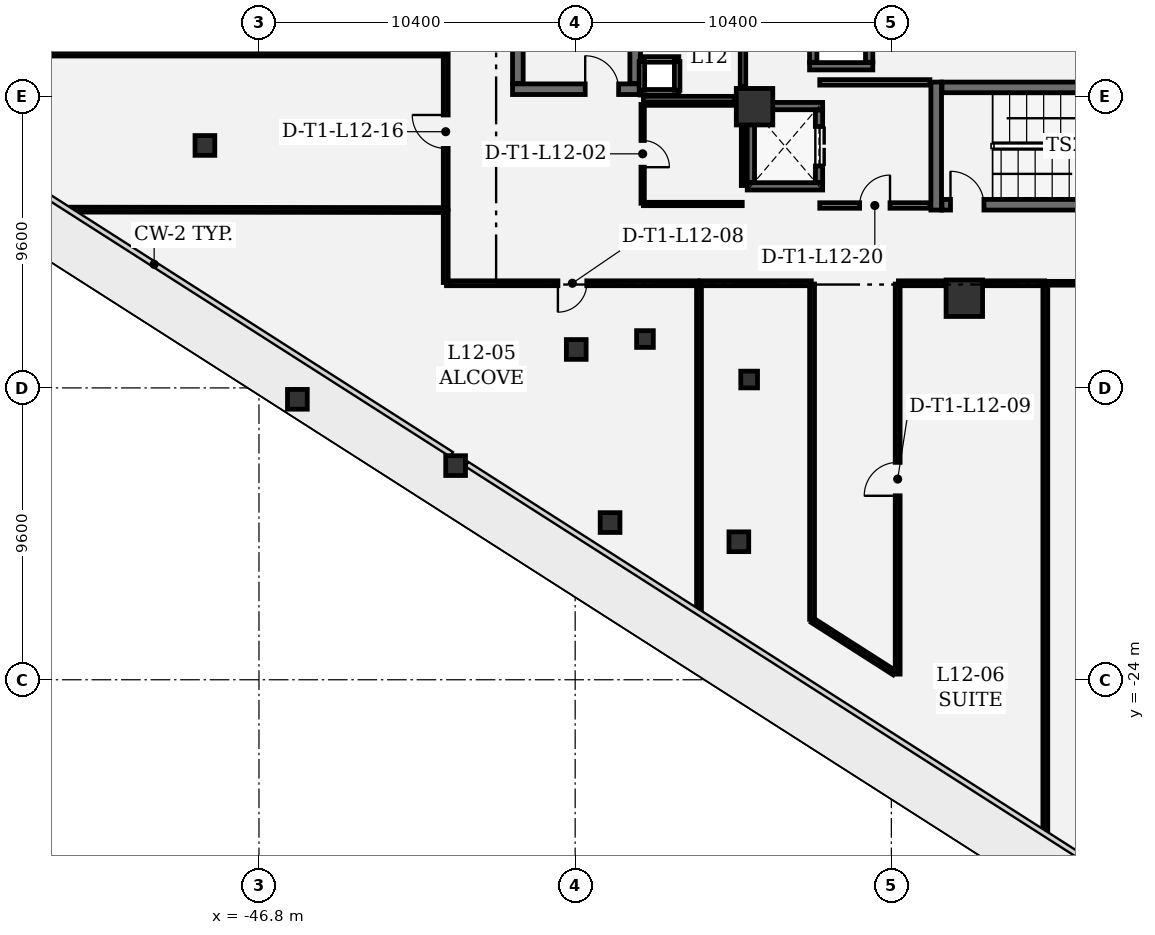
"""IFC4 building model, lengths in metres.
Left out: names, types, materials, properties, quantities, classifications, styles, units other than length and angle.
Written with IfcOpenShell. Run it as: python <this file> out.ifc"""

import sys

from ifc_helpers import new_model, si_unit, direction, frame, frame_2d, origin, origin_2d, place, context, subcontext, project, spatial, rectangle, extrude, element, fill, save


model = new_model("IFC4")
c1 = context("Model", 3, precision=1e-05, world=origin(), true_north=direction((0.0, 1.0)))
c2 = subcontext(c1, "Body", "Model", "MODEL_VIEW")
j1 = project(units=[si_unit("LENGTHUNIT", "METRE"), si_unit("PLANEANGLEUNIT", "RADIAN")], contexts=[c1])
p1 = place(None, origin())
s1 = spatial("IfcSite", under=j1, at=p1, CompositionType="ELEMENT")
p2 = place(p1, origin())
s2 = spatial("IfcBuilding", under=s1, at=p2, CompositionType="ELEMENT")
p3 = place(p2, frame((0.0, 0.0, 57.6)))
s3 = spatial("IfcBuildingStorey", under=s2, at=p3, CompositionType="ELEMENT", Elevation=57.6)
for number, where, z_axis, x_axis in (
    (1, (-23.6, -11.45, 0.0), (0.0, 0.0, 1.0), (1.0, 0.0, 0.0)),
    (2, (-30.5, -5.15, 0.0), (0.0, 0.0, 1.0), (1.0, 0.0, 0.0)),
):
    element("IfcColumn", number, at=place(p3, frame(where, z_axis=z_axis, x_axis=x_axis)), inside=s3, PredefinedType="COLUMN", context=c2, shape_type="SweptSolid", body=[
        extrude(rectangle(XDim=1.2, YDim=1.2, at=origin_2d()), origin(), (0.0, 0.0, 1.0), 4.2),
    ])
for number, where, z_axis, x_axis in (
    (3, (-45.536, -14.775, 0.0), (0.0, 0.0, 1.0), (1.0, 0.0, 0.0)),
    (4, (-40.333, -16.956, 0.0), (0.0, 0.0, 1.0), (1.0, 0.0, 0.0)),
    (5, (-35.252, -18.829, 0.0), (0.0, 0.0, 1.0), (1.0, 0.0, 0.0)),
    (6, (-31.016, -19.46, 0.0), (0.0, 0.0, 1.0), (1.0, 0.0, 0.0)),
    (7, (-48.578, -6.425, 0.0), (0.0, 0.0, 1.0), (1.0, 0.0, 0.0)),
    (8, (-36.365, -13.135, 0.0), (0.0, 0.0, 1.0), (1.0, 0.0, 0.0)),
):
    element("IfcColumn", number, at=place(p3, frame(where, z_axis=z_axis, x_axis=x_axis)), inside=s3, PredefinedType="COLUMN", context=c2, shape_type="SweptSolid", body=[
        extrude(rectangle(XDim=0.65, YDim=0.65, at=origin_2d()), origin(), (0.0, 0.0, 1.0), 4.2),
    ])
for number, where, z_axis, x_axis in (
    (9, (-34.104, -12.792, 0.0), (0.0, 0.0, 1.0), (1.0, 0.0, 0.0)),
    (10, (-30.677, -14.124, 0.0), (0.0, 0.0, 1.0), (1.0, 0.0, 0.0)),
):
    element("IfcColumn", number, at=place(p3, frame(where, z_axis=z_axis, x_axis=x_axis)), inside=s3, PredefinedType="COLUMN", context=c2, shape_type="SweptSolid", body=[
        extrude(rectangle(XDim=0.55, YDim=0.55, at=origin_2d()), origin(), (0.0, 0.0, 1.0), 4.2),
    ])
p4 = place(p3, frame((-24.525, -4.34, 0.0), z_axis=(0.0, 0.0, 1.0), x_axis=(0.0, -1.0, 0.0)))
e11 = element("IfcWall", 11, at=p4, inside=s3, PredefinedType="SHEAR", context=c2, shape_type="SweptSolid", body=[
    extrude(rectangle(XDim=4.21, YDim=0.35, at=frame_2d((2.105, 0.0))), origin(), (0.0, 0.0, 1.0), 3.92),
])
p5 = place(p3, frame((-24.335, -8.375, 0.0), z_axis=(0.0, 0.0, 1.0), x_axis=(1.0, 0.0, 0.0)))
e12 = element("IfcWall", 12, at=p5, inside=s3, PredefinedType="SHEAR", context=c2, shape_type="SweptSolid", body=[
    extrude(rectangle(XDim=8.12, YDim=0.35, at=frame_2d((4.06, 0.0))), origin(), (0.0, 0.0, 1.0), 3.92),
])
p6 = place(p5, frame((0.28, 0.0, 0.0)))
e13 = element("IfcOpeningElement", 13, at=p6, cuts=e12, PredefinedType="OPENING", context=c2, shape_type="SweptSolid", body=[
    extrude(rectangle(XDim=1.1, YDim=2.2, at=frame_2d((0.55, 1.1))), frame((0.0, 0.185, 0.0), z_axis=(0.0, -1.0, 0.0), x_axis=(1.0, 0.0, 0.0)), (0.0, 0.0, 1.0), 0.37),
])
p7 = place(p3, frame((-16.215, -4.515, 0.0), z_axis=(0.0, 0.0, 1.0), x_axis=(-1.0, 0.0, 0.0)))
e14 = element("IfcWall", 14, at=p7, inside=s3, PredefinedType="SHEAR", context=c2, shape_type="SweptSolid", body=[
    extrude(rectangle(XDim=8.12, YDim=0.35, at=frame_2d((4.06, 0.0))), origin(), (0.0, 0.0, 1.0), 3.92),
])
p8 = place(p3, frame((-38.46, -4.575, 0.0), z_axis=(0.0, 0.0, 1.0), x_axis=(1.0, 0.0, 0.0)))
e15 = element("IfcWall", 15, at=p8, inside=s3, PredefinedType="SHEAR", context=c2, shape_type="SweptSolid", body=[
    extrude(rectangle(XDim=4.21, YDim=0.35, at=frame_2d((2.105, 0.0))), origin(), (0.0, 0.0, 1.0), 3.92),
])
p9 = place(p8, frame((2.39, 0.0, 0.0)))
e16 = element("IfcOpeningElement", 16, at=p9, cuts=e15, PredefinedType="OPENING", context=c2, shape_type="SweptSolid", body=[
    extrude(rectangle(XDim=1.1, YDim=2.2, at=frame_2d((0.55, 1.1))), frame((0.0, 0.185, 0.0), z_axis=(0.0, -1.0, 0.0), x_axis=(1.0, 0.0, 0.0)), (0.0, 0.0, 1.0), 0.37),
])
for number, where, z_axis, x_axis in (
    (17, (-34.425, -4.385, 0.0), (0.0, 0.0, 1.0), (0.0, 1.0, 0.0)),
    (18, (-38.285, 4.385, 0.0), (0.0, 0.0, 1.0), (0.0, -1.0, 0.0)),
):
    element("IfcWall", number, at=place(p3, frame(where, z_axis=z_axis, x_axis=x_axis)), inside=s3, PredefinedType="SHEAR", context=c2, shape_type="SweptSolid", body=[
        extrude(rectangle(XDim=8.77, YDim=0.35, at=frame_2d((4.385, 0.0))), origin(), (0.0, 0.0, 1.0), 3.92),
    ])
for number, where, z_axis, x_axis in (
    (19, (-28.26, -7.77, 0.0), (0.0, 0.0, 1.0), (-1.0, 0.0, 0.0)),
    (20, (-30.74, -5.13, 0.0), (0.0, 0.0, 1.0), (1.0, 0.0, 0.0)),
):
    element("IfcWall", number, at=place(p3, frame(where, z_axis=z_axis, x_axis=x_axis)), inside=s3, PredefinedType="SHEAR", context=c2, shape_type="SweptSolid", body=[
        extrude(rectangle(XDim=2.48, YDim=0.24, at=frame_2d((1.24, 0.0))), origin(), (0.0, 0.0, 1.0), 3.92),
    ])
p10 = place(p3, frame((-30.62, -7.638, 0.0), z_axis=(0.0, 0.0, 1.0), x_axis=(0.0, 1.0, 0.0)))
e21 = element("IfcWall", 21, at=p10, inside=s3, PredefinedType="SHEAR", context=c2, shape_type="SweptSolid", body=[
    extrude(rectangle(XDim=2.376, YDim=0.24, at=frame_2d((1.188, 0.0))), origin(), (0.0, 0.0, 1.0), 3.92),
])
p11 = place(p3, frame((-28.38, -5.262, 0.0), z_axis=(0.0, 0.0, 1.0), x_axis=(0.0, -1.0, 0.0)))
e22 = element("IfcWall", 22, at=p11, inside=s3, PredefinedType="SHEAR", context=c2, shape_type="SweptSolid", body=[
    extrude(rectangle(XDim=2.376, YDim=0.24, at=frame_2d((1.188, 0.0))), origin(), (0.0, 0.0, 1.0), 3.92),
])
p12 = place(p11, frame((0.538, 0.0, 0.0)))
e23 = element("IfcOpeningElement", 23, at=p12, cuts=e22, PredefinedType="OPENING", context=c2, shape_type="SweptSolid", body=[
    extrude(rectangle(XDim=1.3, YDim=2.3, at=frame_2d((0.65, 1.15))), frame((0.0, 0.13, 0.0), z_axis=(0.0, -1.0, 0.0), x_axis=(1.0, 0.0, 0.0)), (0.0, 0.0, 1.0), 0.26),
])
p13 = place(p3, frame((-26.61, -3.82, 0.0), z_axis=(0.0, 0.0, 1.0), x_axis=(-1.0, 0.0, 0.0)))
e24 = element("IfcWall", 24, at=p13, inside=s3, PredefinedType="SHEAR", context=c2, shape_type="SweptSolid", body=[
    extrude(rectangle(XDim=2.08, YDim=0.24, at=frame_2d((1.04, 0.0))), origin(), (0.0, 0.0, 1.0), 3.92),
])
for number, where, z_axis, x_axis in (
    (25, (-28.57, -3.688, 0.0), (0.0, 0.0, 1.0), (0.0, 1.0, 0.0)),
    (26, (-26.73, -1.562, 0.0), (0.0, 0.0, 1.0), (0.0, -1.0, 0.0)),
):
    element("IfcWall", number, at=place(p3, frame(where, z_axis=z_axis, x_axis=x_axis)), inside=s3, PredefinedType="SHEAR", context=c2, shape_type="SweptSolid", body=[
        extrude(rectangle(XDim=2.126, YDim=0.24, at=frame_2d((1.063, 0.0))), origin(), (0.0, 0.0, 1.0), 3.92),
    ])
for number, where, z_axis, x_axis in (
    (27, (-32.99, -4.675, 0.0), (0.0, 0.0, 1.0), (-1.0, 0.0, 0.0)),
    (28, (-34.26, -3.595, 0.0), (0.0, 0.0, 1.0), (1.0, 0.0, 0.0)),
):
    element("IfcWall", number, at=place(p3, frame(where, z_axis=z_axis, x_axis=x_axis)), inside=s3, PredefinedType="PARTITIONING", context=c2, shape_type="SweptSolid", body=[
        extrude(rectangle(XDim=1.27, YDim=0.18, at=frame_2d((0.635, 0.0))), origin(), (0.0, 0.0, 1.0), 3.92),
    ])
for number, where, z_axis, x_axis in (
    (29, (-34.205, -4.61, 0.0), (0.0, 0.0, 1.0), (0.0, 1.0, 0.0)),
    (30, (-33.045, -3.66, 0.0), (0.0, 0.0, 1.0), (0.0, -1.0, 0.0)),
):
    element("IfcWall", number, at=place(p3, frame(where, z_axis=z_axis, x_axis=x_axis)), inside=s3, PredefinedType="PARTITIONING", context=c2, shape_type="SweptSolid", body=[
        extrude(rectangle(XDim=0.95, YDim=0.18, at=frame_2d((0.475, 0.0))), origin(), (0.0, 0.0, 1.0), 3.92),
    ])
p14 = place(p3, frame((-28.355, -8.4, 0.0), z_axis=(0.0, 0.0, 1.0), x_axis=(1.0, 0.0, 0.0)))
e31 = element("IfcWall", 31, at=p14, inside=s3, PredefinedType="PARTITIONING", context=c2, shape_type="SweptSolid", body=[
    extrude(rectangle(XDim=3.622, YDim=0.18, at=frame_2d((1.811, 0.0))), origin(), (0.0, 0.0, 1.0), 3.92),
])
p15 = place(p14, frame((1.311, 0.0, 0.0)))
e32 = element("IfcOpeningElement", 32, at=p15, cuts=e31, PredefinedType="OPENING", context=c2, shape_type="SweptSolid", body=[
    extrude(rectangle(XDim=1.0, YDim=2.15, at=frame_2d((0.5, 1.075))), frame((0.0, 0.1, 0.0), z_axis=(0.0, -1.0, 0.0), x_axis=(1.0, 0.0, 0.0)), (0.0, 0.0, 1.0), 0.2),
])
p16 = place(p3, frame((-24.733, -4.35, 0.0), z_axis=(0.0, 0.0, 1.0), x_axis=(-1.0, 0.0, 0.0)))
e33 = element("IfcWall", 33, at=p16, inside=s3, PredefinedType="PARTITIONING", context=c2, shape_type="SweptSolid", body=[
    extrude(rectangle(XDim=3.622, YDim=0.18, at=frame_2d((1.811, 0.0))), origin(), (0.0, 0.0, 1.0), 3.92),
])
p17 = place(p3, frame((-34.155, -8.35, 0.0), z_axis=(0.0, 0.0, 1.0), x_axis=(1.0, 0.0, 0.0)))
e34 = element("IfcWall", 34, at=p17, inside=s3, PredefinedType="PARTITIONING", context=c2, shape_type="SweptSolid", body=[
    extrude(rectangle(XDim=3.25, YDim=0.11, at=frame_2d((1.625, 0.0))), origin(), (0.0, 0.0, 1.0), 3.92),
])
p18 = place(p3, frame((-30.88, -7.743, 0.0), z_axis=(0.0, 0.0, 1.0), x_axis=(0.0, 1.0, 0.0)))
e35 = element("IfcWall", 35, at=p18, inside=s3, PredefinedType="PARTITIONING", context=c2, shape_type="SweptSolid", body=[
    extrude(rectangle(XDim=1.928, YDim=0.11, at=frame_2d((0.964, 0.0))), origin(), (0.0, 0.0, 1.0), 3.92),
])
p19 = place(p3, frame((-31.165, -5.05, 0.0), z_axis=(0.0, 0.0, 1.0), x_axis=(-1.0, 0.0, 0.0)))
e36 = element("IfcWall", 36, at=p19, inside=s3, PredefinedType="PARTITIONING", context=c2, shape_type="SweptSolid", body=[
    extrude(rectangle(XDim=2.99, YDim=0.11, at=frame_2d((1.495, 0.0))), origin(), (0.0, 0.0, 1.0), 3.92),
])
p20 = place(p3, frame((-34.18, -5.075, 0.0), z_axis=(0.0, 0.0, 1.0), x_axis=(0.0, -1.0, 0.0)))
e37 = element("IfcWall", 37, at=p20, inside=s3, PredefinedType="PARTITIONING", context=c2, shape_type="SweptSolid", body=[
    extrude(rectangle(XDim=3.25, YDim=0.11, at=frame_2d((1.625, 0.0))), origin(), (0.0, 0.0, 1.0), 3.92),
])
p21 = place(p20, frame((1.185, 0.0, 0.0)))
e38 = element("IfcOpeningElement", 38, at=p21, cuts=e37, PredefinedType="OPENING", context=c2, shape_type="SweptSolid", body=[
    extrude(rectangle(XDim=0.88, YDim=2.1, at=frame_2d((0.44, 1.05))), frame((0.0, 0.065, 0.0), z_axis=(0.0, -1.0, 0.0), x_axis=(1.0, 0.0, 0.0)), (0.0, 0.0, 1.0), 0.13),
])
p22 = place(p3, frame((-34.155, -4.9, 0.0), z_axis=(0.0, 0.0, 1.0), x_axis=(1.0, 0.0, 0.0)))
e39 = element("IfcWall", 39, at=p22, inside=s3, PredefinedType="PARTITIONING", context=c2, shape_type="SweptSolid", body=[
    extrude(rectangle(XDim=2.99, YDim=0.18, at=frame_2d((1.495, 0.0))), origin(), (0.0, 0.0, 1.0), 3.92),
])
p23 = place(p3, frame((-30.88, -4.485, 0.0), z_axis=(0.0, 0.0, 1.0), x_axis=(0.0, 1.0, 0.0)))
e40 = element("IfcWall", 40, at=p23, inside=s3, PredefinedType="PARTITIONING", context=c2, shape_type="SweptSolid", body=[
    extrude(rectangle(XDim=2.86, YDim=0.18, at=frame_2d((1.43, 0.0))), origin(), (0.0, 0.0, 1.0), 3.92),
])
p24 = place(p3, frame((-32.352, -10.958, 0.0), z_axis=(0.0, 0.0, 1.0), x_axis=(-1.0, 0.0, 0.0)))
e41 = element("IfcWall", 41, at=p24, inside=s3, PredefinedType="PARTITIONING", context=c2, shape_type="SweptSolid", body=[
    extrude(rectangle(XDim=8.281, YDim=0.16, at=frame_2d((4.141, 0.0))), origin(), (0.0, 0.0, 1.0), 3.433),
])
p25 = place(p24, frame((3.666, 0.0, 0.0)))
e42 = element("IfcOpeningElement", 42, at=p25, cuts=e41, PredefinedType="OPENING", context=c2, shape_type="SweptSolid", body=[
    extrude(rectangle(XDim=0.95, YDim=2.15, at=frame_2d((0.475, 1.075))), frame((0.0, 0.09, 0.0), z_axis=(0.0, -1.0, 0.0), x_axis=(1.0, 0.0, 0.0)), (0.0, 0.0, 1.0), 0.18),
])
p26 = place(p3, frame((-40.658, -8.575, 0.0), z_axis=(0.0, 0.0, 1.0), x_axis=(0.0, -1.0, 0.0)))
e43 = element("IfcWall", 43, at=p26, inside=s3, PredefinedType="PARTITIONING", context=c2, shape_type="SweptSolid", body=[
    extrude(rectangle(XDim=2.358, YDim=0.16, at=frame_2d((1.179, 0.0))), origin(), (0.0, 0.0, 1.0), 3.92),
])
p27 = place(p3, frame((-40.683, -8.55, 0.0), z_axis=(0.0, 0.0, 1.0), x_axis=(-0.999999290934, 0.001190853395, 0.0)))
e44 = element("IfcWall", 44, at=p27, inside=s3, PredefinedType="PARTITIONING", context=c2, shape_type="SweptSolid", body=[
    extrude(rectangle(XDim=12.301, YDim=0.16, at=frame_2d((6.15, 0.0))), origin(), (0.0, 0.0, 1.0), 2.89),
])
p28 = place(p3, frame((-32.327, -21.709, 0.0), z_axis=(0.0, 0.0, 1.0), x_axis=(0.0, 1.0, 0.0)))
e45 = element("IfcWall", 45, at=p28, inside=s3, PredefinedType="PARTITIONING", context=c2, shape_type="SweptSolid", body=[
    extrude(rectangle(XDim=10.726, YDim=0.16, at=frame_2d((5.363, 0.0))), origin(), (0.0, 0.0, 1.0), 3.92),
])
p29 = place(p3, frame((-24.265, -10.958, 0.0), z_axis=(0.0, 0.0, 1.0), x_axis=(-1.0, 0.0, 0.0)))
e46 = element("IfcWall", 46, at=p29, inside=s3, PredefinedType="PARTITIONING", context=c2, shape_type="SweptSolid", body=[
    extrude(rectangle(XDim=1.502, YDim=0.16, at=frame_2d((0.751, 0.0))), origin(), (0.0, 0.0, 1.0), 3.92),
])
p30 = place(p3, frame((-25.792, -23.814, 0.0), z_axis=(0.0, 0.0, 1.0), x_axis=(0.0, 1.0, 0.0)))
e47 = element("IfcWall", 47, at=p30, inside=s3, PredefinedType="PARTITIONING", context=c2, shape_type="SweptSolid", body=[
    extrude(rectangle(XDim=12.831, YDim=0.16, at=frame_2d((6.416, 0.0))), origin(), (0.0, 0.0, 1.0), 3.92),
])
p31 = place(p30, frame((5.865, 0.0, 0.0)))
e48 = element("IfcOpeningElement", 48, at=p31, cuts=e47, PredefinedType="OPENING", context=c2, shape_type="SweptSolid", body=[
    extrude(rectangle(XDim=1.1, YDim=2.15, at=frame_2d((0.55, 1.075))), frame((0.0, 0.09, 0.0), z_axis=(0.0, -1.0, 0.0), x_axis=(1.0, 0.0, 0.0)), (0.0, 0.0, 1.0), 0.18),
])
p32 = place(p3, frame((-28.587, -22.052, 0.0), z_axis=(0.0, 0.0, 1.0), x_axis=(0.842617189406, -0.538513019451, 0.0)))
e49 = element("IfcWall", 49, at=p32, inside=s3, PredefinedType="PARTITIONING", context=c2, shape_type="SweptSolid", body=[
    extrude(rectangle(XDim=3.191, YDim=0.16, at=frame_2d((1.596, 0.0))), origin(), (0.0, 0.0, 1.0), 3.92),
])
p33 = place(p3, frame((-28.608, -10.983, 0.0), z_axis=(0.0, 0.0, 1.0), x_axis=(0.0, -1.0, 0.0)))
e50 = element("IfcWall", 50, at=p33, inside=s3, PredefinedType="PARTITIONING", context=c2, shape_type="SweptSolid", body=[
    extrude(rectangle(XDim=11.031, YDim=0.16, at=frame_2d((5.516, 0.0))), origin(), (0.0, 0.0, 1.0), 3.433),
])
p34 = place(p3, frame((-28.633, -10.958, 0.0), z_axis=(0.0, 0.0, 1.0), x_axis=(-1.0, 0.0, 0.0)))
e51 = element("IfcWall", 51, at=p34, inside=s3, PredefinedType="PARTITIONING", context=c2, shape_type="SweptSolid", body=[
    extrude(rectangle(XDim=3.661, YDim=0.16, at=frame_2d((1.831, 0.0))), origin(), (0.0, 0.0, 1.0), 3.92),
])
p35 = place(p3, frame((-20.936, -28.989, 0.0), z_axis=(0.0, 0.0, 1.0), x_axis=(0.0, 1.0, 0.0)))
e52 = element("IfcWall", 52, at=p35, inside=s3, PredefinedType="PARTITIONING", context=c2, shape_type="SweptSolid", body=[
    extrude(rectangle(XDim=18.006, YDim=0.16, at=frame_2d((9.003, 0.0))), origin(), (0.0, 0.0, 1.0), 2.957),
])
p36 = place(p3, frame((-20.961, -10.958, 0.0), z_axis=(0.0, 0.0, 1.0), x_axis=(-1.0, 0.0, 0.0)))
e53 = element("IfcWall", 53, at=p36, inside=s3, PredefinedType="PARTITIONING", context=c2, shape_type="SweptSolid", body=[
    extrude(rectangle(XDim=1.974, YDim=0.16, at=frame_2d((0.987, 0.0))), origin(), (0.0, 0.0, 1.0), 3.92),
])
p37 = place(p3, frame((-17.865, -10.958, 0.0), z_axis=(0.0, 0.0, 1.0), x_axis=(-1.0, 0.0, 0.0)))
e54 = element("IfcWall", 54, at=p37, inside=s3, PredefinedType="PARTITIONING", context=c2, shape_type="SweptSolid", body=[
    extrude(rectangle(XDim=3.038, YDim=0.125, at=frame_2d((1.519, 0.0))), origin(), (0.0, 0.0, 1.0), 3.92),
])
p38 = place(p3, frame((-40.658, -8.517, 0.0), z_axis=(0.0, 0.0, 1.0), x_axis=(0.0, 1.0, 0.0)))
e55 = element("IfcWall", 55, at=p38, inside=s3, PredefinedType="PARTITIONING", context=c2, shape_type="SweptSolid", body=[
    extrude(rectangle(XDim=5.089, YDim=0.16, at=frame_2d((2.545, 0.0))), origin(), (0.0, 0.0, 1.0), 3.92),
])
p39 = place(p38, frame((1.995, 0.0, 0.0)))
e56 = element("IfcOpeningElement", 56, at=p39, cuts=e55, PredefinedType="OPENING", context=c2, shape_type="SweptSolid", body=[
    extrude(rectangle(XDim=1.1, YDim=2.15, at=frame_2d((0.55, 1.075))), frame((0.0, 0.09, 0.0), z_axis=(0.0, -1.0, 0.0), x_axis=(1.0, 0.0, 0.0)), (0.0, 0.0, 1.0), 0.18),
])
p40 = place(p3, frame((-40.683, -3.403, 0.0), z_axis=(0.0, 0.0, 1.0), x_axis=(-1.0, 0.0, 0.0)))
e57 = element("IfcWall", 57, at=p40, inside=s3, PredefinedType="PARTITIONING", context=c2, shape_type="SweptSolid", body=[
    extrude(rectangle(XDim=13.335, YDim=0.16, at=frame_2d((6.667, 0.0))), origin(), (0.0, 0.0, 1.0), 2.89),
])
p41 = place(p3, frame((-40.658, -3.37, 0.0), z_axis=(0.0, 0.0, 1.0), x_axis=(0.0, 1.0, 0.0)))
e58 = element("IfcWall", 58, at=p41, inside=s3, PredefinedType="PARTITIONING", context=c2, shape_type="SweptSolid", body=[
    extrude(rectangle(XDim=5.048, YDim=0.125, at=frame_2d((2.524, 0.0))), origin(), (0.0, 0.0, 1.0), 3.92),
])
p42 = place(p41, frame((2.049, 0.0, 0.0)))
e59 = element("IfcOpeningElement", 59, at=p42, cuts=e58, PredefinedType="OPENING", context=c2, shape_type="SweptSolid", body=[
    extrude(rectangle(XDim=0.95, YDim=2.15, at=frame_2d((0.475, 1.075))), frame((0.0, 0.073, 0.0), z_axis=(0.0, -1.0, 0.0), x_axis=(1.0, 0.0, 0.0)), (0.0, 0.0, 1.0), 0.145),
])
p43 = place(p6, origin())
e60 = element("IfcDoor", 60, at=p43, inside=s3, OperationType="SINGLE_SWING_LEFT", PredefinedType="DOOR", context=c2, shape_type="SweptSolid", body=[
    extrude(rectangle(XDim=1.1, YDim=2.2, at=frame_2d((0.55, 1.1))), frame((0.0, 0.025, 0.0), z_axis=(0.0, -1.0, 0.0), x_axis=(1.0, 0.0, 0.0)), (0.0, 0.0, 1.0), 0.05),
])
fill(e13, e60)
p44 = place(p9, origin())
e61 = element("IfcDoor", 61, at=p44, inside=s3, OperationType="SINGLE_SWING_LEFT", PredefinedType="DOOR", context=c2, shape_type="SweptSolid", body=[
    extrude(rectangle(XDim=1.1, YDim=2.2, at=frame_2d((0.55, 1.1))), frame((0.0, 0.025, 0.0), z_axis=(0.0, -1.0, 0.0), x_axis=(1.0, 0.0, 0.0)), (0.0, 0.0, 1.0), 0.05),
])
fill(e16, e61)
p45 = place(p12, origin())
e62 = element("IfcDoor", 62, at=p45, inside=s3, OperationType="DOUBLE_DOOR_SLIDING", PredefinedType="DOOR", context=c2, shape_type="SweptSolid", body=[
    extrude(rectangle(XDim=1.3, YDim=2.3, at=frame_2d((0.65, 1.15))), frame((0.0, 0.025, 0.0), z_axis=(0.0, -1.0, 0.0), x_axis=(1.0, 0.0, 0.0)), (0.0, 0.0, 1.0), 0.05),
])
fill(e23, e62)
p46 = place(p21, origin())
e63 = element("IfcDoor", 63, at=p46, inside=s3, OperationType="SINGLE_SWING_RIGHT", PredefinedType="DOOR", context=c2, shape_type="SweptSolid", body=[
    extrude(rectangle(XDim=0.88, YDim=2.1, at=frame_2d((0.44, 1.05))), frame((0.0, 0.025, 0.0), z_axis=(0.0, -1.0, 0.0), x_axis=(1.0, 0.0, 0.0)), (0.0, 0.0, 1.0), 0.05),
])
fill(e38, e63)
p47 = place(p25, origin())
e64 = element("IfcDoor", 64, at=p47, inside=s3, OperationType="SINGLE_SWING_RIGHT", PredefinedType="DOOR", context=c2, shape_type="SweptSolid", body=[
    extrude(rectangle(XDim=0.95, YDim=2.15, at=frame_2d((0.475, 1.075))), frame((0.0, 0.025, 0.0), z_axis=(0.0, -1.0, 0.0), x_axis=(1.0, 0.0, 0.0)), (0.0, 0.0, 1.0), 0.05),
])
fill(e42, e64)
p48 = place(p31, origin())
e65 = element("IfcDoor", 65, at=p48, inside=s3, OperationType="SINGLE_SWING_LEFT", PredefinedType="DOOR", context=c2, shape_type="SweptSolid", body=[
    extrude(rectangle(XDim=1.1, YDim=2.15, at=frame_2d((0.55, 1.075))), frame((0.0, 0.025, 0.0), z_axis=(0.0, -1.0, 0.0), x_axis=(1.0, 0.0, 0.0)), (0.0, 0.0, 1.0), 0.05),
])
fill(e48, e65)
p49 = place(p39, origin())
e66 = element("IfcDoor", 66, at=p49, inside=s3, OperationType="SINGLE_SWING_RIGHT", PredefinedType="DOOR", context=c2, shape_type="SweptSolid", body=[
    extrude(rectangle(XDim=1.1, YDim=2.15, at=frame_2d((0.55, 1.075))), frame((0.0, 0.025, 0.0), z_axis=(0.0, -1.0, 0.0), x_axis=(1.0, 0.0, 0.0)), (0.0, 0.0, 1.0), 0.05),
])
fill(e56, e66)
p50 = place(p15, origin())
e67 = element("IfcDoor", 67, at=p50, inside=s3, OperationType="SINGLE_SWING_RIGHT", PredefinedType="DOOR", context=c2, shape_type="SweptSolid", body=[
    extrude(rectangle(XDim=1.0, YDim=2.15, at=frame_2d((0.5, 1.075))), frame((0.0, 0.025, 0.0), z_axis=(0.0, -1.0, 0.0), x_axis=(1.0, 0.0, 0.0)), (0.0, 0.0, 1.0), 0.05),
])
fill(e32, e67)
save(model, sys.argv[1])
